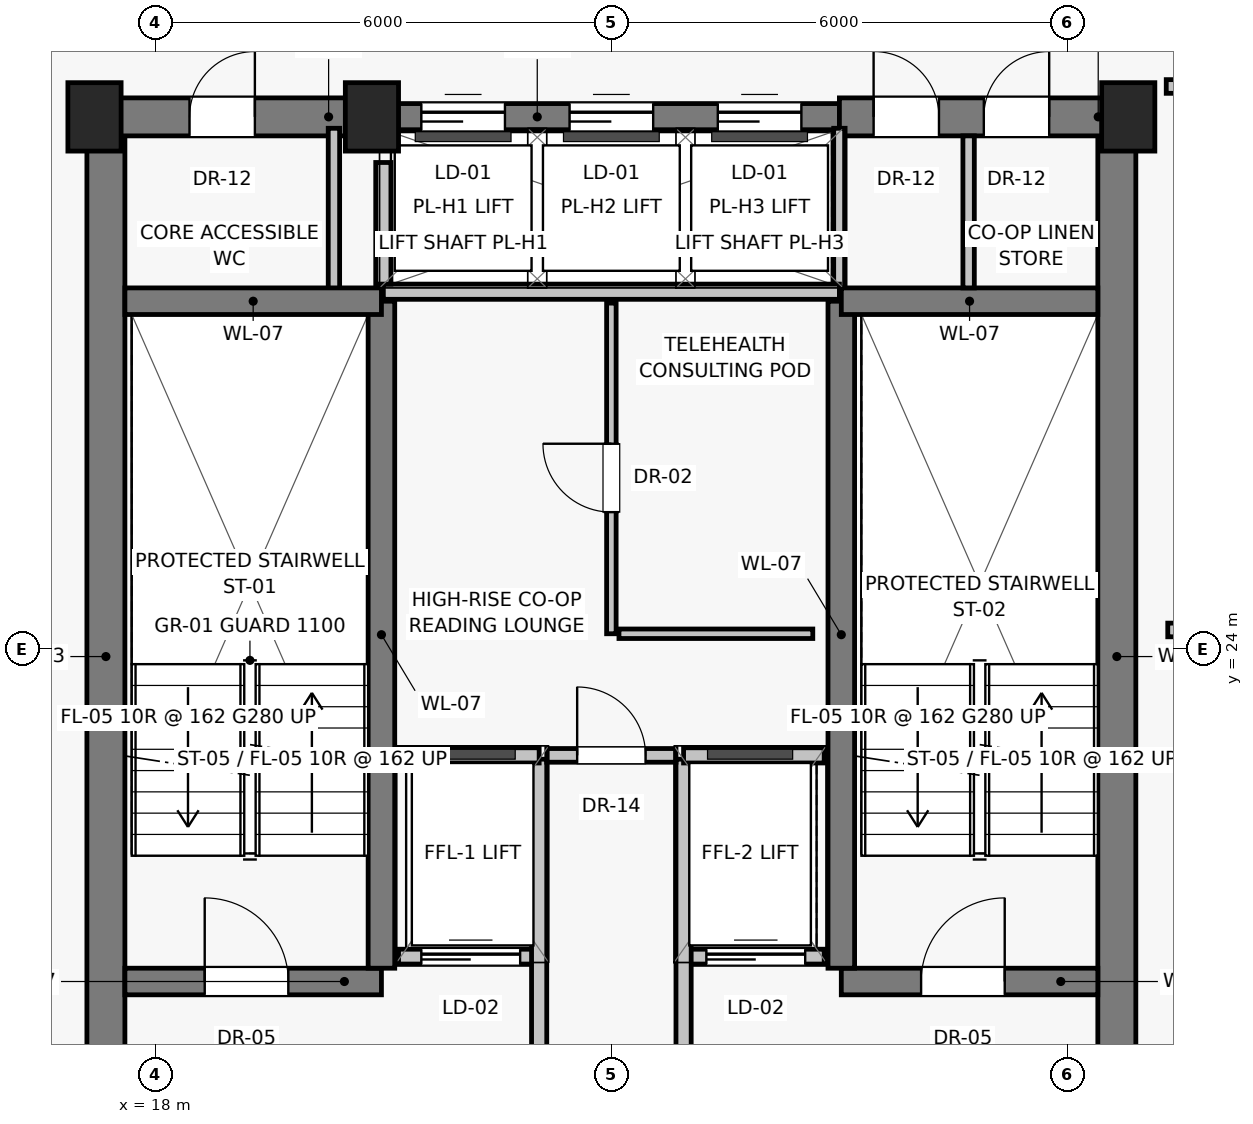
"""IFC4 building model, lengths in metres.
Left out: names, types, materials, properties, quantities, classifications, styles, units other than length and angle.
Written with IfcOpenShell. Run it as: python <this file> out.ifc"""

import sys

from ifc_helpers import new_model, si_unit, direction, frame, frame_2d, origin, origin_2d, place, context, subcontext, project, spatial, rectangle, extrude, source, transform, mapped, element, fill, save


model = new_model("IFC4")
c1 = context("Model", 3, precision=1e-05, world=origin(), true_north=direction((0.0, 1.0)))
c2 = subcontext(c1, "Body", "Model", "MODEL_VIEW")
j1 = project(units=[si_unit("LENGTHUNIT", "METRE"), si_unit("PLANEANGLEUNIT", "RADIAN")], contexts=[c1])
p1 = place(None, origin())
s1 = spatial("IfcSite", under=j1, at=p1, CompositionType="ELEMENT")
p2 = place(p1, origin())
s2 = spatial("IfcBuilding", under=s1, at=p2, CompositionType="ELEMENT")
p3 = place(p2, frame((0.0, 0.0, 230.05)))
s3 = spatial("IfcBuildingStorey", under=s2, at=p3, CompositionType="ELEMENT", Elevation=230.05)
for number, where, z_axis, x_axis in (
    (1, (17.2, 31.0, 0.0), (0.0, 0.0, 1.0), (1.0, 0.0, 0.0)),
    (2, (20.85, 31.0, 0.0), (0.0, 0.0, 1.0), (1.0, 0.0, 0.0)),
    (3, (30.8, 31.0, 0.0), (0.0, 0.0, 1.0), (1.0, 0.0, 0.0)),
):
    element("IfcColumn", number, at=place(p3, frame(where, z_axis=z_axis, x_axis=x_axis)), inside=s3, PredefinedType="PILASTER", context=c2, shape_type="SweptSolid", body=[
        extrude(rectangle(XDim=0.7, YDim=0.9, at=origin_2d()), origin(), (0.0, 0.0, 1.0), 3.25),
    ])
for number, where, z_axis, x_axis in (
    (4, (17.35, 16.8, 0.0), (0.0, 0.0, 1.0), (0.0, 1.0, 0.0)),
    (5, (30.65, 16.8, 0.0), (0.0, 0.0, 1.0), (0.0, 1.0, 0.0)),
):
    element("IfcWall", number, at=place(p3, frame(where, z_axis=z_axis, x_axis=x_axis)), inside=s3, PredefinedType="SHEAR", context=c2, shape_type="SweptSolid", body=[
        extrude(rectangle(XDim=14.2, YDim=0.5, at=frame_2d((7.1, 0.0))), origin(), (0.0, 0.0, 1.0), 3.015),
    ])
p4 = place(p3, frame((17.2, 31.0, 0.0), z_axis=(0.0, 0.0, 1.0), x_axis=(1.0, 0.0, 0.0)))
e6 = element("IfcWall", 6, at=p4, inside=s3, PredefinedType="SHEAR", context=c2, shape_type="SweptSolid", body=[
    extrude(rectangle(XDim=3.8, YDim=0.5, at=frame_2d((1.9, 0.0))), origin(), (0.0, 0.0, 1.0), 3.015),
])
p5 = place(p4, frame((1.25, 0.0, 0.0)))
e7 = element("IfcOpeningElement", 7, at=p5, cuts=e6, PredefinedType="OPENING", context=c2, shape_type="SweptSolid", body=[
    extrude(rectangle(XDim=0.86, YDim=2.01, at=frame_2d((0.43, 1.005))), frame((0.0, 0.26, 0.0), z_axis=(0.0, -1.0, 0.0), x_axis=(1.0, 0.0, 0.0)), (0.0, 0.0, 1.0), 0.52),
])
p6 = place(p3, frame((21.0, 31.0, 0.0), z_axis=(0.0, 0.0, 1.0), x_axis=(1.0, 0.0, 0.0)))
e8 = element("IfcWall", 8, at=p6, inside=s3, PredefinedType="SHEAR", context=c2, shape_type="SweptSolid", body=[
    extrude(rectangle(XDim=6.0, YDim=0.35, at=frame_2d((3.0, 0.0))), origin(), (0.0, 0.0, 1.0), 3.015),
])
p7 = place(p6, frame((0.5, 0.0, 0.0)))
e9 = element("IfcOpeningElement", 9, at=p7, cuts=e8, PredefinedType="OPENING", context=c2, shape_type="SweptSolid", body=[
    extrude(rectangle(XDim=1.1, YDim=2.08, at=frame_2d((0.55, 1.04))), frame((0.0, 0.185, 0.0), z_axis=(0.0, -1.0, 0.0), x_axis=(1.0, 0.0, 0.0)), (0.0, 0.0, 1.0), 0.37),
])
p8 = place(p6, frame((2.45, 0.0, 0.0)))
e10 = element("IfcOpeningElement", 10, at=p8, cuts=e8, PredefinedType="OPENING", context=c2, shape_type="SweptSolid", body=[
    extrude(rectangle(XDim=1.1, YDim=2.08, at=frame_2d((0.55, 1.04))), frame((0.0, 0.185, 0.0), z_axis=(0.0, -1.0, 0.0), x_axis=(1.0, 0.0, 0.0)), (0.0, 0.0, 1.0), 0.37),
])
p9 = place(p6, frame((4.4, 0.0, 0.0)))
e11 = element("IfcOpeningElement", 11, at=p9, cuts=e8, PredefinedType="OPENING", context=c2, shape_type="SweptSolid", body=[
    extrude(rectangle(XDim=1.1, YDim=2.08, at=frame_2d((0.55, 1.04))), frame((0.0, 0.185, 0.0), z_axis=(0.0, -1.0, 0.0), x_axis=(1.0, 0.0, 0.0)), (0.0, 0.0, 1.0), 0.37),
])
p10 = place(p3, frame((27.0, 31.0, 0.0), z_axis=(0.0, 0.0, 1.0), x_axis=(1.0, 0.0, 0.0)))
e12 = element("IfcWall", 12, at=p10, inside=s3, PredefinedType="SHEAR", context=c2, shape_type="SweptSolid", body=[
    extrude(rectangle(XDim=3.8, YDim=0.5, at=frame_2d((1.9, 0.0))), origin(), (0.0, 0.0, 1.0), 3.015),
])
p11 = place(p10, frame((0.45, 0.0, 0.0)))
e13 = element("IfcOpeningElement", 13, at=p11, cuts=e12, PredefinedType="OPENING", context=c2, shape_type="SweptSolid", body=[
    extrude(rectangle(XDim=0.86, YDim=2.01, at=frame_2d((0.43, 1.005))), frame((0.0, 0.26, 0.0), z_axis=(0.0, -1.0, 0.0), x_axis=(1.0, 0.0, 0.0)), (0.0, 0.0, 1.0), 0.52),
])
p12 = place(p10, frame((1.9, 0.0, 0.0)))
e14 = element("IfcOpeningElement", 14, at=p12, cuts=e12, PredefinedType="OPENING", context=c2, shape_type="SweptSolid", body=[
    extrude(rectangle(XDim=0.86, YDim=2.01, at=frame_2d((0.43, 1.005))), frame((0.0, 0.26, 0.0), z_axis=(0.0, -1.0, 0.0), x_axis=(1.0, 0.0, 0.0)), (0.0, 0.0, 1.0), 0.52),
])
for number, where, z_axis, x_axis in (
    (15, (20.35, 28.65, 0.0), (0.0, 0.0, 1.0), (0.0, 1.0, 0.0)),
    (16, (27.0, 28.65, 0.0), (0.0, 0.0, 1.0), (0.0, 1.0, 0.0)),
):
    element("IfcWall", number, at=place(p3, frame(where, z_axis=z_axis, x_axis=x_axis)), inside=s3, PredefinedType="PARTITIONING", context=c2, shape_type="SweptSolid", body=[
        extrude(rectangle(XDim=2.2, YDim=0.15, at=frame_2d((1.1, 0.0))), origin(), (0.0, 0.0, 1.0), 3.015),
    ])
p13 = place(p3, frame((17.6, 19.625, 0.0), z_axis=(0.0, 0.0, 1.0), x_axis=(1.0, 0.0, 0.0)))
e17 = element("IfcWall", 17, at=p13, inside=s3, PredefinedType="SHEAR", context=c2, shape_type="SweptSolid", body=[
    extrude(rectangle(XDim=3.375, YDim=0.35, at=frame_2d((1.688, 0.0))), origin(), (0.0, 0.0, 1.0), 3.015),
])
p14 = place(p13, frame((1.05, 0.0, 0.0)))
e18 = element("IfcOpeningElement", 18, at=p14, cuts=e17, PredefinedType="OPENING", context=c2, shape_type="SweptSolid", body=[
    extrude(rectangle(XDim=1.1, YDim=2.03, at=frame_2d((0.55, 1.015))), frame((0.0, 0.185, 0.0), z_axis=(0.0, -1.0, 0.0), x_axis=(1.0, 0.0, 0.0)), (0.0, 0.0, 1.0), 0.37),
])
p15 = place(p3, frame((21.2, 19.95, 0.0), z_axis=(0.0, 0.0, 1.0), x_axis=(1.0, 0.0, 0.0)))
e19 = element("IfcWall", 19, at=p15, inside=s3, PredefinedType="SOLIDWALL", context=c2, shape_type="SweptSolid", body=[
    extrude(rectangle(XDim=1.85, YDim=0.2, at=frame_2d((0.925, 0.0))), origin(), (0.0, 0.0, 1.0), 3.015),
])
p16 = place(p15, frame((0.3, 0.0, 0.0)))
e20 = element("IfcOpeningElement", 20, at=p16, cuts=e19, PredefinedType="OPENING", context=c2, shape_type="SweptSolid", body=[
    extrude(rectangle(XDim=1.3, YDim=2.25, at=frame_2d((0.65, 1.125))), frame((0.0, 0.11, 0.0), z_axis=(0.0, -1.0, 0.0), x_axis=(1.0, 0.0, 0.0)), (0.0, 0.0, 1.0), 0.22),
])
p17 = place(p3, frame((24.95, 19.95, 0.0), z_axis=(0.0, 0.0, 1.0), x_axis=(1.0, 0.0, 0.0)))
e21 = element("IfcWall", 21, at=p17, inside=s3, PredefinedType="SOLIDWALL", context=c2, shape_type="SweptSolid", body=[
    extrude(rectangle(XDim=1.85, YDim=0.2, at=frame_2d((0.925, 0.0))), origin(), (0.0, 0.0, 1.0), 3.015),
])
p18 = place(p17, frame((0.3, 0.0, 0.0)))
e22 = element("IfcOpeningElement", 22, at=p18, cuts=e21, PredefinedType="OPENING", context=c2, shape_type="SweptSolid", body=[
    extrude(rectangle(XDim=1.3, YDim=2.25, at=frame_2d((0.65, 1.125))), frame((0.0, 0.11, 0.0), z_axis=(0.0, -1.0, 0.0), x_axis=(1.0, 0.0, 0.0)), (0.0, 0.0, 1.0), 0.22),
])
p19 = place(p3, frame((27.025, 19.625, 0.0), z_axis=(0.0, 0.0, 1.0), x_axis=(1.0, 0.0, 0.0)))
e23 = element("IfcWall", 23, at=p19, inside=s3, PredefinedType="SHEAR", context=c2, shape_type="SweptSolid", body=[
    extrude(rectangle(XDim=3.375, YDim=0.35, at=frame_2d((1.688, 0.0))), origin(), (0.0, 0.0, 1.0), 3.015),
])
p20 = place(p19, frame((1.05, 0.0, 0.0)))
e24 = element("IfcOpeningElement", 24, at=p20, cuts=e23, PredefinedType="OPENING", context=c2, shape_type="SweptSolid", body=[
    extrude(rectangle(XDim=1.1, YDim=2.03, at=frame_2d((0.55, 1.015))), frame((0.0, 0.185, 0.0), z_axis=(0.0, -1.0, 0.0), x_axis=(1.0, 0.0, 0.0)), (0.0, 0.0, 1.0), 0.37),
])
for number, where, z_axis, x_axis in (
    (25, (20.975, 19.8, 0.0), (0.0, 0.0, 1.0), (0.0, 1.0, 0.0)),
    (26, (27.025, 19.8, 0.0), (0.0, 0.0, 1.0), (0.0, 1.0, 0.0)),
):
    element("IfcWall", number, at=place(p3, frame(where, z_axis=z_axis, x_axis=x_axis)), inside=s3, PredefinedType="SHEAR", context=c2, shape_type="SweptSolid", body=[
        extrude(rectangle(XDim=8.775, YDim=0.35, at=frame_2d((4.387, 0.0))), origin(), (0.0, 0.0, 1.0), 3.015),
    ])
for number, where, z_axis, x_axis in (
    (27, (17.6, 28.575, 0.0), (0.0, 0.0, 1.0), (1.0, 0.0, 0.0)),
    (28, (27.025, 28.575, 0.0), (0.0, 0.0, 1.0), (1.0, 0.0, 0.0)),
):
    element("IfcWall", number, at=place(p3, frame(where, z_axis=z_axis, x_axis=x_axis)), inside=s3, PredefinedType="SHEAR", context=c2, shape_type="SweptSolid", body=[
        extrude(rectangle(XDim=3.375, YDim=0.35, at=frame_2d((1.688, 0.0))), origin(), (0.0, 0.0, 1.0), 3.015),
    ])
for number, where, z_axis, x_axis in (
    (29, (23.05, 16.95, 0.0), (0.0, 0.0, 1.0), (0.0, 1.0, 0.0)),
    (30, (24.95, 16.95, 0.0), (0.0, 0.0, 1.0), (0.0, 1.0, 0.0)),
):
    element("IfcWall", number, at=place(p3, frame(where, z_axis=z_axis, x_axis=x_axis)), inside=s3, PredefinedType="SOLIDWALL", context=c2, shape_type="SweptSolid", body=[
        extrude(rectangle(XDim=5.6, YDim=0.2, at=frame_2d((2.8, 0.0))), origin(), (0.0, 0.0, 1.0), 3.015),
    ])
for number, where, z_axis, x_axis in (
    (31, (21.2, 22.6, 0.0), (0.0, 0.0, 1.0), (1.0, 0.0, 0.0)),
    (32, (24.95, 22.6, 0.0), (0.0, 0.0, 1.0), (1.0, 0.0, 0.0)),
):
    element("IfcWall", number, at=place(p3, frame(where, z_axis=z_axis, x_axis=x_axis)), inside=s3, PredefinedType="SOLIDWALL", context=c2, shape_type="SweptSolid", body=[
        extrude(rectangle(XDim=1.85, YDim=0.2, at=frame_2d((0.925, 0.0))), origin(), (0.0, 0.0, 1.0), 3.015),
    ])
p21 = place(p3, frame((21.0, 28.7, 0.0), z_axis=(0.0, 0.0, 1.0), x_axis=(1.0, 0.0, 0.0)))
e33 = element("IfcWall", 33, at=p21, inside=s3, PredefinedType="SOLIDWALL", context=c2, shape_type="SweptSolid", body=[
    extrude(rectangle(XDim=6.0, YDim=0.2, at=frame_2d((3.0, 0.0))), origin(), (0.0, 0.0, 1.0), 3.015),
])
p22 = place(p3, frame((21.0, 28.8, 0.0), z_axis=(0.0, 0.0, 1.0), x_axis=(0.0, 1.0, 0.0)))
e34 = element("IfcWall", 34, at=p22, inside=s3, PredefinedType="SOLIDWALL", context=c2, shape_type="SweptSolid", body=[
    extrude(rectangle(XDim=1.6, YDim=0.2, at=frame_2d((0.8, 0.0))), origin(), (0.0, 0.0, 1.0), 3.015),
])
p23 = place(p3, frame((23.15, 22.6, 0.0), z_axis=(0.0, 0.0, 1.0), x_axis=(1.0, 0.0, 0.0)))
e35 = element("IfcWall", 35, at=p23, inside=s3, PredefinedType="PARTITIONING", context=c2, shape_type="SweptSolid", body=[
    extrude(rectangle(XDim=1.7, YDim=0.18, at=frame_2d((0.85, 0.0))), origin(), (0.0, 0.0, 1.0), 3.015),
])
p24 = place(p23, frame((0.4, 0.0, 0.0)))
e36 = element("IfcOpeningElement", 36, at=p24, cuts=e35, PredefinedType="OPENING", context=c2, shape_type="SweptSolid", body=[
    extrude(rectangle(XDim=0.9, YDim=2.01, at=frame_2d((0.45, 1.005))), frame((0.0, 0.1, 0.0), z_axis=(0.0, -1.0, 0.0), x_axis=(1.0, 0.0, 0.0)), (0.0, 0.0, 1.0), 0.2),
])
p25 = place(p3, frame((24.1, 24.2, 0.0), z_axis=(0.0, 0.0, 1.0), x_axis=(1.0, 0.0, 0.0)))
e37 = element("IfcWall", 37, at=p25, inside=s3, PredefinedType="PARTITIONING", context=c2, shape_type="SweptSolid", body=[
    extrude(rectangle(XDim=2.55, YDim=0.125, at=frame_2d((1.275, 0.0))), origin(), (0.0, 0.0, 1.0), 3.015),
])
p26 = place(p3, frame((24.0, 24.2, 0.0), z_axis=(0.0, 0.0, 1.0), x_axis=(0.0, 1.0, 0.0)))
e38 = element("IfcWall", 38, at=p26, inside=s3, PredefinedType="PARTITIONING", context=c2, shape_type="SweptSolid", body=[
    extrude(rectangle(XDim=4.35, YDim=0.125, at=frame_2d((2.175, 0.0))), origin(), (0.0, 0.0, 1.0), 3.015),
])
p27 = place(p26, frame((1.6, 0.0, 0.0)))
e39 = element("IfcOpeningElement", 39, at=p27, cuts=e38, PredefinedType="OPENING", context=c2, shape_type="SweptSolid", body=[
    extrude(rectangle(XDim=0.9, YDim=2.01, at=frame_2d((0.45, 1.005))), frame((0.0, 0.073, 0.0), z_axis=(0.0, -1.0, 0.0), x_axis=(1.0, 0.0, 0.0)), (0.0, 0.0, 1.0), 0.145),
])
p28 = place(p3, frame((28.7, 28.75, 0.0), z_axis=(0.0, 0.0, 1.0), x_axis=(0.0, 1.0, 0.0)))
e40 = element("IfcWall", 40, at=p28, inside=s3, PredefinedType="PARTITIONING", context=c2, shape_type="SweptSolid", body=[
    extrude(rectangle(XDim=2.0, YDim=0.15, at=frame_2d((1.0, 0.0))), origin(), (0.0, 0.0, 1.0), 3.015),
])
p29 = place(p3, frame((31.32, 24.25, 0.0), z_axis=(0.0, 0.0, 1.0), x_axis=(1.0, 0.0, 0.0)))
e41 = element("IfcWall", 41, at=p29, inside=s3, PredefinedType="PARTITIONING", context=c2, shape_type="SweptSolid", body=[
    extrude(rectangle(XDim=9.299, YDim=0.18, at=frame_2d((4.649, 0.0))), origin(), (0.0, 0.0, 1.0), 3.015),
])
p30 = place(p3, frame((31.3, 31.4, 0.0), z_axis=(0.0, 0.0, 1.0), x_axis=(1.0, 0.0, 0.0)))
e42 = element("IfcWall", 42, at=p30, inside=s3, PredefinedType="PARTITIONING", context=c2, shape_type="SweptSolid", body=[
    extrude(rectangle(XDim=1.92, YDim=0.18, at=frame_2d((0.96, 0.0))), origin(), (0.0, 0.0, 1.0), 3.015),
])
p31 = place(p30, frame((0.72, 0.0, 0.0)))
e43 = element("IfcOpeningElement", 43, at=p31, cuts=e42, PredefinedType="OPENING", context=c2, shape_type="SweptSolid", body=[
    extrude(rectangle(XDim=1.0, YDim=2.01, at=frame_2d((0.5, 1.005))), frame((0.0, 0.1, 0.0), z_axis=(0.0, -1.0, 0.0), x_axis=(1.0, 0.0, 0.0)), (0.0, 0.0, 1.0), 0.2),
])
m1 = source(origin(), c2, "Body", "SweptSolid", [
    extrude(rectangle(XDim=0.86, YDim=2.01, at=frame_2d((0.43, 1.005))), frame((0.0, 0.025, 0.0), z_axis=(0.0, -1.0, 0.0), x_axis=(1.0, 0.0, 0.0)), (0.0, 0.0, 1.0), 0.05),
])
p32 = place(p5, origin())
e44 = element("IfcDoor", 44, at=p32, inside=s3, OperationType="SINGLE_SWING_RIGHT", PredefinedType="DOOR", context=c2, shape_type="MappedRepresentation", body=[
    mapped(m1, transform((0.0, 0.0, 0.0), scale=1.0)),
])
fill(e7, e44)
m2 = source(origin(), c2, "Body", "SweptSolid", [
    extrude(rectangle(XDim=1.1, YDim=2.08, at=frame_2d((0.55, 1.04))), frame((0.0, 0.025, 0.0), z_axis=(0.0, -1.0, 0.0), x_axis=(1.0, 0.0, 0.0)), (0.0, 0.0, 1.0), 0.05),
])
p33 = place(p7, origin())
e45 = element("IfcDoor", 45, at=p33, inside=s3, OperationType="SLIDING_TO_LEFT", PredefinedType="DOOR", context=c2, shape_type="MappedRepresentation", body=[
    mapped(m2, transform((0.0, 0.0, 0.0), scale=1.0)),
])
fill(e9, e45)
p34 = place(p8, origin())
e46 = element("IfcDoor", 46, at=p34, inside=s3, OperationType="SLIDING_TO_LEFT", PredefinedType="DOOR", context=c2, shape_type="MappedRepresentation", body=[
    mapped(m2, transform((0.0, 0.0, 0.0), scale=1.0)),
])
fill(e10, e46)
p35 = place(p9, origin())
e47 = element("IfcDoor", 47, at=p35, inside=s3, OperationType="SLIDING_TO_LEFT", PredefinedType="DOOR", context=c2, shape_type="MappedRepresentation", body=[
    mapped(m2, transform((0.0, 0.0, 0.0), scale=1.0)),
])
fill(e11, e47)
p36 = place(p11, origin())
e48 = element("IfcDoor", 48, at=p36, inside=s3, OperationType="SINGLE_SWING_LEFT", PredefinedType="DOOR", context=c2, shape_type="MappedRepresentation", body=[
    mapped(m1, transform((0.0, 0.0, 0.0), scale=1.0)),
])
fill(e13, e48)
p37 = place(p12, origin())
e49 = element("IfcDoor", 49, at=p37, inside=s3, OperationType="SINGLE_SWING_RIGHT", PredefinedType="DOOR", context=c2, shape_type="MappedRepresentation", body=[
    mapped(m1, transform((0.0, 0.0, 0.0), scale=1.0)),
])
fill(e14, e49)
m3 = source(origin(), c2, "Body", "SweptSolid", [
    extrude(rectangle(XDim=1.1, YDim=2.03, at=frame_2d((0.55, 1.015))), frame((0.0, 0.025, 0.0), z_axis=(0.0, -1.0, 0.0), x_axis=(1.0, 0.0, 0.0)), (0.0, 0.0, 1.0), 0.05),
])
p38 = place(p14, origin())
e50 = element("IfcDoor", 50, at=p38, inside=s3, OperationType="SINGLE_SWING_LEFT", PredefinedType="DOOR", context=c2, shape_type="MappedRepresentation", body=[
    mapped(m3, transform((0.0, 0.0, 0.0), scale=1.0)),
])
fill(e18, e50)
m4 = source(origin(), c2, "Body", "SweptSolid", [
    extrude(rectangle(XDim=1.3, YDim=2.25, at=frame_2d((0.65, 1.125))), frame((0.0, 0.025, 0.0), z_axis=(0.0, -1.0, 0.0), x_axis=(1.0, 0.0, 0.0)), (0.0, 0.0, 1.0), 0.05),
])
p39 = place(p16, origin())
e51 = element("IfcDoor", 51, at=p39, inside=s3, OperationType="SLIDING_TO_LEFT", PredefinedType="DOOR", context=c2, shape_type="MappedRepresentation", body=[
    mapped(m4, transform((0.0, 0.0, 0.0), scale=1.0)),
])
fill(e20, e51)
p40 = place(p18, origin())
e52 = element("IfcDoor", 52, at=p40, inside=s3, OperationType="SLIDING_TO_LEFT", PredefinedType="DOOR", context=c2, shape_type="MappedRepresentation", body=[
    mapped(m4, transform((0.0, 0.0, 0.0), scale=1.0)),
])
fill(e22, e52)
p41 = place(p20, origin())
e53 = element("IfcDoor", 53, at=p41, inside=s3, OperationType="SINGLE_SWING_RIGHT", PredefinedType="DOOR", context=c2, shape_type="MappedRepresentation", body=[
    mapped(m3, transform((0.0, 0.0, 0.0), scale=1.0)),
])
fill(e24, e53)
m5 = source(origin(), c2, "Body", "SweptSolid", [
    extrude(rectangle(XDim=0.9, YDim=2.01, at=frame_2d((0.45, 1.005))), frame((0.0, 0.025, 0.0), z_axis=(0.0, -1.0, 0.0), x_axis=(1.0, 0.0, 0.0)), (0.0, 0.0, 1.0), 0.05),
])
p42 = place(p24, origin())
e54 = element("IfcDoor", 54, at=p42, inside=s3, OperationType="SINGLE_SWING_LEFT", PredefinedType="DOOR", context=c2, shape_type="MappedRepresentation", body=[
    mapped(m5, transform((0.0, 0.0, 0.0), scale=1.0)),
])
fill(e36, e54)
p43 = place(p27, origin())
e55 = element("IfcDoor", 55, at=p43, inside=s3, OperationType="SINGLE_SWING_RIGHT", PredefinedType="DOOR", context=c2, shape_type="MappedRepresentation", body=[
    mapped(m5, transform((0.0, 0.0, 0.0), scale=1.0)),
])
fill(e39, e55)
save(model, sys.argv[1])
